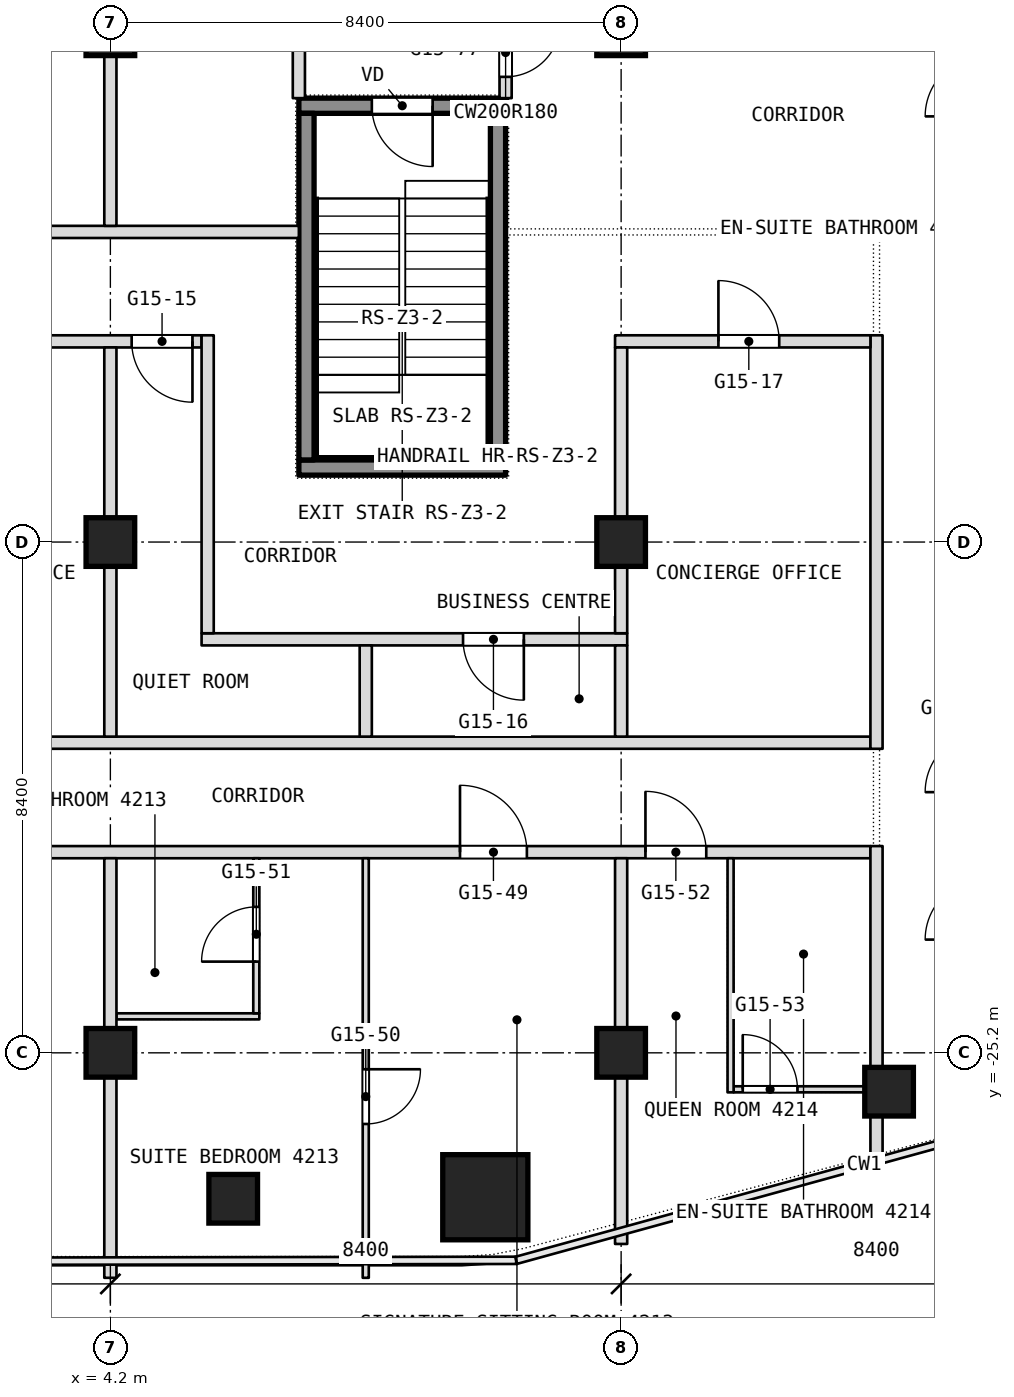
"""IFC4 building model, lengths in metres.
Left out: names, types, materials, properties, quantities, classifications, styles, units other than length and angle.
Written with IfcOpenShell. Run it as: python <this file> out.ifc"""

import sys

from ifc_helpers import new_model, si_unit, direction, frame, frame_2d, origin, origin_2d, place, context, subcontext, project, spatial, rectangle, extrude, element, fill, save


model = new_model("IFC4")
c1 = context("Model", 3, precision=1e-05, world=origin(), true_north=direction((0.0, 1.0)))
c2 = subcontext(c1, "Body", "Model", "MODEL_VIEW")
j1 = project(units=[si_unit("LENGTHUNIT", "METRE"), si_unit("PLANEANGLEUNIT", "RADIAN")], contexts=[c1])
p1 = place(None, origin())
s1 = spatial("IfcSite", under=j1, at=p1, CompositionType="ELEMENT")
p2 = place(p1, origin())
s2 = spatial("IfcBuilding", under=s1, at=p2, CompositionType="ELEMENT")
p3 = place(p2, frame((0.0, 0.0, 187.7)))
s3 = spatial("IfcBuildingStorey", under=s2, at=p3, CompositionType="ELEMENT", Elevation=187.7)
p4 = place(p3, frame((10.366, -27.575, 0.0), z_axis=(0.0, 0.0, 1.0), x_axis=(1.0, 0.0, 0.0)))
e1 = element("IfcColumn", 1, at=p4, inside=s3, PredefinedType="COLUMN", context=c2, shape_type="SweptSolid", body=[
    extrude(rectangle(XDim=1.4, YDim=1.4, at=origin_2d()), origin(), (0.0, 0.0, 1.0), 3.6),
])
for number, where, z_axis, x_axis in (
    (2, (4.2, -25.2, 0.0), (0.0, 0.0, 1.0), (1.0, 0.0, 0.0)),
    (3, (4.2, -16.8, 0.0), (0.0, 0.0, 1.0), (1.0, 0.0, 0.0)),
    (4, (4.2, -8.4, 0.0), (0.0, 0.0, 1.0), (1.0, 0.0, 0.0)),
    (5, (12.6, -25.2, 0.0), (0.0, 0.0, 1.0), (1.0, 0.0, 0.0)),
    (6, (12.6, -16.8, 0.0), (0.0, 0.0, 1.0), (1.0, 0.0, 0.0)),
    (7, (12.6, -8.4, 0.0), (0.0, 0.0, 1.0), (1.0, 0.0, 0.0)),
    (8, (17.007, -25.839, 0.0), (0.0, 0.0, 1.0), (1.0, 0.0, 0.0)),
    (9, (6.22, -27.6, 0.0), (0.0, 0.0, 1.0), (1.0, 0.0, 0.0)),
):
    element("IfcColumn", number, at=place(p3, frame(where, z_axis=z_axis, x_axis=x_axis)), inside=s3, PredefinedType="COLUMN", context=c2, shape_type="SweptSolid", body=[
        extrude(rectangle(XDim=0.8, YDim=0.8, at=origin_2d()), origin(), (0.0, 0.0, 1.0), 3.6),
    ])
p5 = place(p3, frame((14.45, -25.8, 0.0), z_axis=(0.0, 0.0, 1.0), x_axis=(1.0, 0.0, 0.0)))
e10 = element("IfcWall", 10, at=p5, inside=s3, PredefinedType="PARTITIONING", context=c2, shape_type="SweptSolid", body=[
    extrude(rectangle(XDim=2.25, YDim=0.1, at=frame_2d((1.125, 0.0))), origin(), (0.0, 0.0, 1.0), 3.34),
])
p6 = place(p5, frame((0.15, 0.0, 0.0)))
e11 = element("IfcOpeningElement", 11, at=p6, cuts=e10, PredefinedType="OPENING", context=c2, shape_type="SweptSolid", body=[
    extrude(rectangle(XDim=0.9, YDim=2.1, at=frame_2d((0.45, 1.05))), frame((0.0, 0.05, 0.0), z_axis=(0.0, -1.0, 0.0), x_axis=(1.0, 0.0, 0.0)), (0.0, 0.0, 1.0), 0.1),
])
p7 = place(p3, frame((4.3, -24.6, 0.0), z_axis=(0.0, 0.0, 1.0), x_axis=(1.0, 0.0, 0.0)))
e12 = element("IfcWall", 12, at=p7, inside=s3, PredefinedType="PARTITIONING", context=c2, shape_type="SweptSolid", body=[
    extrude(rectangle(XDim=2.35, YDim=0.1, at=frame_2d((1.175, 0.0))), origin(), (0.0, 0.0, 1.0), 3.34),
])
p8 = place(p3, frame((-16.7, -21.9, 0.0), z_axis=(0.0, 0.0, 1.0), x_axis=(1.0, 0.0, 0.0)))
e13 = element("IfcWall", 13, at=p8, inside=s3, PredefinedType="PARTITIONING", context=c2, shape_type="SweptSolid", body=[
    extrude(rectangle(XDim=33.4, YDim=0.2, at=frame_2d((16.7, 0.0))), origin(), (0.0, 0.0, 1.0), 3.34),
])
p9 = place(p8, frame((0.3, 0.0, 0.0)))
e14 = element("IfcOpeningElement", 14, at=p9, cuts=e13, PredefinedType="OPENING", context=c2, shape_type="SweptSolid", body=[
    extrude(rectangle(XDim=1.0, YDim=2.1, at=frame_2d((0.5, 1.05))), frame((0.0, 0.1, 0.0), z_axis=(0.0, -1.0, 0.0), x_axis=(1.0, 0.0, 0.0)), (0.0, 0.0, 1.0), 0.2),
])
p10 = place(p8, frame((6.9, 0.0, 0.0)))
e15 = element("IfcOpeningElement", 15, at=p10, cuts=e13, PredefinedType="OPENING", context=c2, shape_type="SweptSolid", body=[
    extrude(rectangle(XDim=1.0, YDim=2.1, at=frame_2d((0.5, 1.05))), frame((0.0, 0.1, 0.0), z_axis=(0.0, -1.0, 0.0), x_axis=(1.0, 0.0, 0.0)), (0.0, 0.0, 1.0), 0.2),
])
p11 = place(p8, frame((8.7, 0.0, 0.0)))
e16 = element("IfcOpeningElement", 16, at=p11, cuts=e13, PredefinedType="OPENING", context=c2, shape_type="SweptSolid", body=[
    extrude(rectangle(XDim=1.0, YDim=2.1, at=frame_2d((0.5, 1.05))), frame((0.0, 0.1, 0.0), z_axis=(0.0, -1.0, 0.0), x_axis=(1.0, 0.0, 0.0)), (0.0, 0.0, 1.0), 0.2),
])
p12 = place(p8, frame((15.8, 0.0, 0.0)))
e17 = element("IfcOpeningElement", 17, at=p12, cuts=e13, PredefinedType="OPENING", context=c2, shape_type="SweptSolid", body=[
    extrude(rectangle(XDim=1.8, YDim=2.1, at=frame_2d((0.9, 1.05))), frame((0.0, 0.1, 0.0), z_axis=(0.0, -1.0, 0.0), x_axis=(1.0, 0.0, 0.0)), (0.0, 0.0, 1.0), 0.2),
])
p13 = place(p8, frame((26.65, 0.0, 0.0)))
e18 = element("IfcOpeningElement", 18, at=p13, cuts=e13, PredefinedType="OPENING", context=c2, shape_type="SweptSolid", body=[
    extrude(rectangle(XDim=1.1, YDim=2.1, at=frame_2d((0.55, 1.05))), frame((0.0, 0.1, 0.0), z_axis=(0.0, -1.0, 0.0), x_axis=(1.0, 0.0, 0.0)), (0.0, 0.0, 1.0), 0.2),
])
p14 = place(p8, frame((29.7, 0.0, 0.0)))
e19 = element("IfcOpeningElement", 19, at=p14, cuts=e13, PredefinedType="OPENING", context=c2, shape_type="SweptSolid", body=[
    extrude(rectangle(XDim=1.0, YDim=2.1, at=frame_2d((0.5, 1.05))), frame((0.0, 0.1, 0.0), z_axis=(0.0, -1.0, 0.0), x_axis=(1.0, 0.0, 0.0)), (0.0, 0.0, 1.0), 0.2),
])
p15 = place(p3, frame((-16.7, -20.1, 0.0), z_axis=(0.0, 0.0, 1.0), x_axis=(1.0, 0.0, 0.0)))
e20 = element("IfcWall", 20, at=p15, inside=s3, PredefinedType="PARTITIONING", context=c2, shape_type="SweptSolid", body=[
    extrude(rectangle(XDim=33.4, YDim=0.2, at=frame_2d((16.7, 0.0))), origin(), (0.0, 0.0, 1.0), 3.34),
])
p16 = place(p3, frame((5.7, -18.4, 0.0), z_axis=(0.0, 0.0, 1.0), x_axis=(1.0, 0.0, 0.0)))
e21 = element("IfcWall", 21, at=p16, inside=s3, PredefinedType="PARTITIONING", context=c2, shape_type="SweptSolid", body=[
    extrude(rectangle(XDim=7.0, YDim=0.2, at=frame_2d((3.5, 0.0))), origin(), (0.0, 0.0, 1.0), 3.34),
])
p17 = place(p16, frame((4.3, 0.0, 0.0)))
e22 = element("IfcOpeningElement", 22, at=p17, cuts=e21, PredefinedType="OPENING", context=c2, shape_type="SweptSolid", body=[
    extrude(rectangle(XDim=1.0, YDim=2.1, at=frame_2d((0.5, 1.05))), frame((0.0, 0.1, 0.0), z_axis=(0.0, -1.0, 0.0), x_axis=(1.0, 0.0, 0.0)), (0.0, 0.0, 1.0), 0.2),
])
p18 = place(p3, frame((16.8, -27.229, 0.0), z_axis=(0.0, 0.0, 1.0), x_axis=(0.0, 1.0, 0.0)))
e23 = element("IfcWall", 23, at=p18, inside=s3, PredefinedType="PARTITIONING", context=c2, shape_type="SweptSolid", body=[
    extrude(rectangle(XDim=5.429, YDim=0.2, at=frame_2d((2.714, 0.0))), origin(), (0.0, 0.0, 1.0), 3.34),
])
p19 = place(p3, frame((16.8, -20.2, 0.0), z_axis=(0.0, 0.0, 1.0), x_axis=(0.0, 1.0, 0.0)))
e24 = element("IfcWall", 24, at=p19, inside=s3, PredefinedType="PARTITIONING", context=c2, shape_type="SweptSolid", body=[
    extrude(rectangle(XDim=6.8, YDim=0.2, at=frame_2d((3.4, 0.0))), origin(), (0.0, 0.0, 1.0), 3.34),
])
p20 = place(p3, frame((14.4, -25.85, 0.0), z_axis=(0.0, 0.0, 1.0), x_axis=(0.0, 1.0, 0.0)))
e25 = element("IfcWall", 25, at=p20, inside=s3, PredefinedType="PARTITIONING", context=c2, shape_type="SweptSolid", body=[
    extrude(rectangle(XDim=3.85, YDim=0.1, at=frame_2d((1.925, 0.0))), origin(), (0.0, 0.0, 1.0), 3.34),
])
p21 = place(p3, frame((-5.9, -13.5, 0.0), z_axis=(0.0, 0.0, 1.0), x_axis=(1.0, 0.0, 0.0)))
e26 = element("IfcWall", 26, at=p21, inside=s3, PredefinedType="PARTITIONING", context=c2, shape_type="SweptSolid", body=[
    extrude(rectangle(XDim=11.6, YDim=0.2, at=frame_2d((5.8, 0.0))), origin(), (0.0, 0.0, 1.0), 3.34),
])
p22 = place(p21, frame((3.3, 0.0, 0.0)))
e27 = element("IfcOpeningElement", 27, at=p22, cuts=e26, PredefinedType="OPENING", context=c2, shape_type="SweptSolid", body=[
    extrude(rectangle(XDim=1.0, YDim=2.1, at=frame_2d((0.5, 1.05))), frame((0.0, 0.1, 0.0), z_axis=(0.0, -1.0, 0.0), x_axis=(1.0, 0.0, 0.0)), (0.0, 0.0, 1.0), 0.2),
])
p23 = place(p21, frame((7.5, 0.0, 0.0)))
e28 = element("IfcOpeningElement", 28, at=p23, cuts=e26, PredefinedType="OPENING", context=c2, shape_type="SweptSolid", body=[
    extrude(rectangle(XDim=1.0, YDim=2.1, at=frame_2d((0.5, 1.05))), frame((0.0, 0.1, 0.0), z_axis=(0.0, -1.0, 0.0), x_axis=(1.0, 0.0, 0.0)), (0.0, 0.0, 1.0), 0.2),
])
p24 = place(p21, frame((10.45, 0.0, 0.0)))
e29 = element("IfcOpeningElement", 29, at=p24, cuts=e26, PredefinedType="OPENING", context=c2, shape_type="SweptSolid", body=[
    extrude(rectangle(XDim=1.0, YDim=2.1, at=frame_2d((0.5, 1.05))), frame((0.0, 0.1, 0.0), z_axis=(0.0, -1.0, 0.0), x_axis=(1.0, 0.0, 0.0)), (0.0, 0.0, 1.0), 0.2),
])
p25 = place(p3, frame((12.5, -13.5, 0.0), z_axis=(0.0, 0.0, 1.0), x_axis=(1.0, 0.0, 0.0)))
e30 = element("IfcWall", 30, at=p25, inside=s3, PredefinedType="PARTITIONING", context=c2, shape_type="SweptSolid", body=[
    extrude(rectangle(XDim=4.2, YDim=0.2, at=frame_2d((2.1, 0.0))), origin(), (0.0, 0.0, 1.0), 3.34),
])
p26 = place(p25, frame((1.7, 0.0, 0.0)))
e31 = element("IfcOpeningElement", 31, at=p26, cuts=e30, PredefinedType="OPENING", context=c2, shape_type="SweptSolid", body=[
    extrude(rectangle(XDim=1.0, YDim=2.1, at=frame_2d((0.5, 1.05))), frame((0.0, 0.1, 0.0), z_axis=(0.0, -1.0, 0.0), x_axis=(1.0, 0.0, 0.0)), (0.0, 0.0, 1.0), 0.2),
])
p27 = place(p3, frame((12.6, -28.343, 0.0), z_axis=(0.0, 0.0, 1.0), x_axis=(0.0, 1.0, 0.0)))
e32 = element("IfcWall", 32, at=p27, inside=s3, PredefinedType="PARTITIONING", context=c2, shape_type="SweptSolid", body=[
    extrude(rectangle(XDim=6.343, YDim=0.2, at=frame_2d((3.171, 0.0))), origin(), (0.0, 0.0, 1.0), 3.34),
])
p28 = place(p3, frame((12.6, -20.0, 0.0), z_axis=(0.0, 0.0, 1.0), x_axis=(0.0, 1.0, 0.0)))
e33 = element("IfcWall", 33, at=p28, inside=s3, PredefinedType="PARTITIONING", context=c2, shape_type="SweptSolid", body=[
    extrude(rectangle(XDim=1.5, YDim=0.2, at=frame_2d((0.75, 0.0))), origin(), (0.0, 0.0, 1.0), 3.34),
])
p29 = place(p3, frame((12.6, -18.3, 0.0), z_axis=(0.0, 0.0, 1.0), x_axis=(0.0, 1.0, 0.0)))
e34 = element("IfcWall", 34, at=p29, inside=s3, PredefinedType="PARTITIONING", context=c2, shape_type="SweptSolid", body=[
    extrude(rectangle(XDim=4.7, YDim=0.2, at=frame_2d((2.35, 0.0))), origin(), (0.0, 0.0, 1.0), 3.34),
])
p30 = place(p3, frame((-7.3, -11.7, 0.0), z_axis=(0.0, 0.0, 1.0), x_axis=(1.0, 0.0, 0.0)))
e35 = element("IfcWall", 35, at=p30, inside=s3, PredefinedType="PARTITIONING", context=c2, shape_type="SweptSolid", body=[
    extrude(rectangle(XDim=14.6, YDim=0.2, at=frame_2d((7.3, 0.0))), origin(), (0.0, 0.0, 1.0), 3.34),
])
p31 = place(p3, frame((10.7, -9.5, 0.0), z_axis=(0.0, 0.0, 1.0), x_axis=(0.0, 1.0, 0.0)))
e36 = element("IfcWall", 36, at=p31, inside=s3, PredefinedType="PARTITIONING", context=c2, shape_type="SweptSolid", body=[
    extrude(rectangle(XDim=1.5, YDim=0.2, at=frame_2d((0.75, 0.0))), origin(), (0.0, 0.0, 1.0), 3.34),
])
p32 = place(p31, frame((0.35, 0.0, 0.0)))
e37 = element("IfcOpeningElement", 37, at=p32, cuts=e36, PredefinedType="OPENING", context=c2, shape_type="SweptSolid", body=[
    extrude(rectangle(XDim=0.9, YDim=2.1, at=frame_2d((0.45, 1.05))), frame((0.0, 0.1, 0.0), z_axis=(0.0, -1.0, 0.0), x_axis=(1.0, 0.0, 0.0)), (0.0, 0.0, 1.0), 0.2),
])
p33 = place(p3, frame((8.4, -28.9, 0.0), z_axis=(0.0, 0.0, 1.0), x_axis=(0.0, 1.0, 0.0)))
e38 = element("IfcWall", 38, at=p33, inside=s3, PredefinedType="PARTITIONING", context=c2, shape_type="SweptSolid", body=[
    extrude(rectangle(XDim=6.9, YDim=0.1, at=frame_2d((3.45, 0.0))), origin(), (0.0, 0.0, 1.0), 3.34),
])
p34 = place(p33, frame((2.53, 0.0, 0.0)))
e39 = element("IfcOpeningElement", 39, at=p34, cuts=e38, PredefinedType="OPENING", context=c2, shape_type="SweptSolid", body=[
    extrude(rectangle(XDim=0.9, YDim=2.1, at=frame_2d((0.45, 1.05))), frame((0.0, 0.05, 0.0), z_axis=(0.0, -1.0, 0.0), x_axis=(1.0, 0.0, 0.0)), (0.0, 0.0, 1.0), 0.1),
])
for number, where, z_axis, x_axis in (
    (40, (8.4, -20.0, 0.0), (0.0, 0.0, 1.0), (0.0, 1.0, 0.0)),
    (41, (7.3, -9.5, 0.0), (0.0, 0.0, 1.0), (0.0, 1.0, 0.0)),
):
    element("IfcWall", number, at=place(p3, frame(where, z_axis=z_axis, x_axis=x_axis)), inside=s3, PredefinedType="PARTITIONING", context=c2, shape_type="SweptSolid", body=[
        extrude(rectangle(XDim=1.5, YDim=0.2, at=frame_2d((0.75, 0.0))), origin(), (0.0, 0.0, 1.0), 3.34),
    ])
p35 = place(p3, frame((6.6, -24.55, 0.0), z_axis=(0.0, 0.0, 1.0), x_axis=(0.0, 1.0, 0.0)))
e42 = element("IfcWall", 42, at=p35, inside=s3, PredefinedType="PARTITIONING", context=c2, shape_type="SweptSolid", body=[
    extrude(rectangle(XDim=2.55, YDim=0.1, at=frame_2d((1.275, 0.0))), origin(), (0.0, 0.0, 1.0), 3.34),
])
p36 = place(p35, frame((0.85, 0.0, 0.0)))
e43 = element("IfcOpeningElement", 43, at=p36, cuts=e42, PredefinedType="OPENING", context=c2, shape_type="SweptSolid", body=[
    extrude(rectangle(XDim=0.9, YDim=2.1, at=frame_2d((0.45, 1.05))), frame((0.0, 0.05, 0.0), z_axis=(0.0, -1.0, 0.0), x_axis=(1.0, 0.0, 0.0)), (0.0, 0.0, 1.0), 0.1),
])
p37 = place(p3, frame((5.8, -18.3, 0.0), z_axis=(0.0, 0.0, 1.0), x_axis=(0.0, 1.0, 0.0)))
e44 = element("IfcWall", 44, at=p37, inside=s3, PredefinedType="PARTITIONING", context=c2, shape_type="SweptSolid", body=[
    extrude(rectangle(XDim=4.9, YDim=0.2, at=frame_2d((2.45, 0.0))), origin(), (0.0, 0.0, 1.0), 3.34),
])
p38 = place(p3, frame((4.2, -28.9, 0.0), z_axis=(0.0, 0.0, 1.0), x_axis=(0.0, 1.0, 0.0)))
e45 = element("IfcWall", 45, at=p38, inside=s3, PredefinedType="PARTITIONING", context=c2, shape_type="SweptSolid", body=[
    extrude(rectangle(XDim=6.9, YDim=0.2, at=frame_2d((3.45, 0.0))), origin(), (0.0, 0.0, 1.0), 3.34),
])
p39 = place(p3, frame((4.2, -20.0, 0.0), z_axis=(0.0, 0.0, 1.0), x_axis=(0.0, 1.0, 0.0)))
e46 = element("IfcWall", 46, at=p39, inside=s3, PredefinedType="PARTITIONING", context=c2, shape_type="SweptSolid", body=[
    extrude(rectangle(XDim=6.4, YDim=0.2, at=frame_2d((3.2, 0.0))), origin(), (0.0, 0.0, 1.0), 3.34),
])
p40 = place(p3, frame((4.2, -11.6, 0.0), z_axis=(0.0, 0.0, 1.0), x_axis=(0.0, 1.0, 0.0)))
e47 = element("IfcWall", 47, at=p40, inside=s3, PredefinedType="PARTITIONING", context=c2, shape_type="SweptSolid", body=[
    extrude(rectangle(XDim=9.7, YDim=0.2, at=frame_2d((4.85, 0.0))), origin(), (0.0, 0.0, 1.0), 3.34),
])
p41 = place(p3, frame((7.3, -15.575, 0.1), z_axis=(0.0, 0.0, 1.0), x_axis=(1.0, 0.0, 0.0)))
e48 = element("IfcWall", 48, at=p41, inside=s3, PredefinedType="SHEAR", context=c2, shape_type="SweptSolid", body=[
    extrude(rectangle(XDim=3.4, YDim=0.25, at=frame_2d((1.7, 0.0))), origin(), (0.0, 0.0, 1.0), 3.6),
])
p42 = place(p3, frame((7.3, -9.625, 0.1), z_axis=(0.0, 0.0, 1.0), x_axis=(1.0, 0.0, 0.0)))
e49 = element("IfcWall", 49, at=p42, inside=s3, PredefinedType="SHEAR", context=c2, shape_type="SweptSolid", body=[
    extrude(rectangle(XDim=3.4, YDim=0.25, at=frame_2d((1.7, 0.0))), origin(), (0.0, 0.0, 1.0), 3.6),
])
p43 = place(p42, frame((1.2, 0.0, 0.0)))
e50 = element("IfcOpeningElement", 50, at=p43, cuts=e49, PredefinedType="OPENING", context=c2, shape_type="SweptSolid", body=[
    extrude(rectangle(XDim=1.0, YDim=2.1, at=frame_2d((0.5, 1.05))), frame((0.0, 0.125, 0.0), z_axis=(0.0, -1.0, 0.0), x_axis=(1.0, 0.0, 0.0)), (0.0, 0.0, 1.0), 0.25),
])
for number, where, z_axis, x_axis in (
    (51, (7.425, -15.45, 0.1), (0.0, 0.0, 1.0), (0.0, 1.0, 0.0)),
    (52, (10.575, -15.45, 0.1), (0.0, 0.0, 1.0), (0.0, 1.0, 0.0)),
):
    element("IfcWall", number, at=place(p3, frame(where, z_axis=z_axis, x_axis=x_axis)), inside=s3, PredefinedType="SHEAR", context=c2, shape_type="SweptSolid", body=[
        extrude(rectangle(XDim=5.7, YDim=0.25, at=frame_2d((2.85, 0.0))), origin(), (0.0, 0.0, 1.0), 3.6),
    ])
p44 = place(p6, origin())
e53 = element("IfcDoor", 53, at=p44, inside=s3, OperationType="SINGLE_SWING_LEFT", PredefinedType="DOOR", context=c2, shape_type="SweptSolid", body=[
    extrude(rectangle(XDim=0.9, YDim=2.1, at=frame_2d((0.45, 1.05))), frame((0.0, 0.025, 0.0), z_axis=(0.0, -1.0, 0.0), x_axis=(1.0, 0.0, 0.0)), (0.0, 0.0, 1.0), 0.05),
])
fill(e11, e53)
p45 = place(p13, origin())
e54 = element("IfcDoor", 54, at=p45, inside=s3, OperationType="SINGLE_SWING_LEFT", PredefinedType="DOOR", context=c2, shape_type="SweptSolid", body=[
    extrude(rectangle(XDim=1.1, YDim=2.1, at=frame_2d((0.55, 1.05))), frame((0.0, 0.025, 0.0), z_axis=(0.0, -1.0, 0.0), x_axis=(1.0, 0.0, 0.0)), (0.0, 0.0, 1.0), 0.05),
])
fill(e18, e54)
p46 = place(p14, origin())
e55 = element("IfcDoor", 55, at=p46, inside=s3, OperationType="SINGLE_SWING_RIGHT", PredefinedType="DOOR", context=c2, shape_type="SweptSolid", body=[
    extrude(rectangle(XDim=1.0, YDim=2.1, at=frame_2d((0.5, 1.05))), frame((0.0, 0.025, 0.0), z_axis=(0.0, -1.0, 0.0), x_axis=(1.0, 0.0, 0.0)), (0.0, 0.0, 1.0), 0.05),
])
fill(e19, e55)
p47 = place(p17, origin())
e56 = element("IfcDoor", 56, at=p47, inside=s3, OperationType="SINGLE_SWING_LEFT", PredefinedType="DOOR", context=c2, shape_type="SweptSolid", body=[
    extrude(rectangle(XDim=1.0, YDim=2.1, at=frame_2d((0.5, 1.05))), frame((0.0, 0.025, 0.0), z_axis=(0.0, -1.0, 0.0), x_axis=(1.0, 0.0, 0.0)), (0.0, 0.0, 1.0), 0.05),
])
fill(e22, e56)
p48 = place(p24, origin())
e57 = element("IfcDoor", 57, at=p48, inside=s3, OperationType="SINGLE_SWING_LEFT", PredefinedType="DOOR", context=c2, shape_type="SweptSolid", body=[
    extrude(rectangle(XDim=1.0, YDim=2.1, at=frame_2d((0.5, 1.05))), frame((0.0, 0.025, 0.0), z_axis=(0.0, -1.0, 0.0), x_axis=(1.0, 0.0, 0.0)), (0.0, 0.0, 1.0), 0.05),
])
fill(e29, e57)
p49 = place(p26, origin())
e58 = element("IfcDoor", 58, at=p49, inside=s3, OperationType="SINGLE_SWING_LEFT", PredefinedType="DOOR", context=c2, shape_type="SweptSolid", body=[
    extrude(rectangle(XDim=1.0, YDim=2.1, at=frame_2d((0.5, 1.05))), frame((0.0, 0.025, 0.0), z_axis=(0.0, -1.0, 0.0), x_axis=(1.0, 0.0, 0.0)), (0.0, 0.0, 1.0), 0.05),
])
fill(e31, e58)
p50 = place(p32, origin())
e59 = element("IfcDoor", 59, at=p50, inside=s3, OperationType="SINGLE_SWING_RIGHT", PredefinedType="DOOR", context=c2, shape_type="SweptSolid", body=[
    extrude(rectangle(XDim=0.9, YDim=2.1, at=frame_2d((0.45, 1.05))), frame((0.0, 0.025, 0.0), z_axis=(0.0, -1.0, 0.0), x_axis=(1.0, 0.0, 0.0)), (0.0, 0.0, 1.0), 0.05),
])
fill(e37, e59)
p51 = place(p34, origin())
e60 = element("IfcDoor", 60, at=p51, inside=s3, OperationType="SINGLE_SWING_LEFT", PredefinedType="DOOR", context=c2, shape_type="SweptSolid", body=[
    extrude(rectangle(XDim=0.9, YDim=2.1, at=frame_2d((0.45, 1.05))), frame((0.0, 0.025, 0.0), z_axis=(0.0, -1.0, 0.0), x_axis=(1.0, 0.0, 0.0)), (0.0, 0.0, 1.0), 0.05),
])
fill(e39, e60)
p52 = place(p36, origin())
e61 = element("IfcDoor", 61, at=p52, inside=s3, OperationType="SINGLE_SWING_RIGHT", PredefinedType="DOOR", context=c2, shape_type="SweptSolid", body=[
    extrude(rectangle(XDim=0.9, YDim=2.1, at=frame_2d((0.45, 1.05))), frame((0.0, 0.025, 0.0), z_axis=(0.0, -1.0, 0.0), x_axis=(1.0, 0.0, 0.0)), (0.0, 0.0, 1.0), 0.05),
])
fill(e43, e61)
p53 = place(p43, origin())
e62 = element("IfcDoor", 62, at=p53, inside=s3, OperationType="SINGLE_SWING_LEFT", PredefinedType="DOOR", context=c2, shape_type="SweptSolid", body=[
    extrude(rectangle(XDim=1.0, YDim=2.1, at=frame_2d((0.5, 1.05))), frame((0.0, 0.025, 0.0), z_axis=(0.0, -1.0, 0.0), x_axis=(1.0, 0.0, 0.0)), (0.0, 0.0, 1.0), 0.05),
])
fill(e50, e62)
save(model, sys.argv[1])
